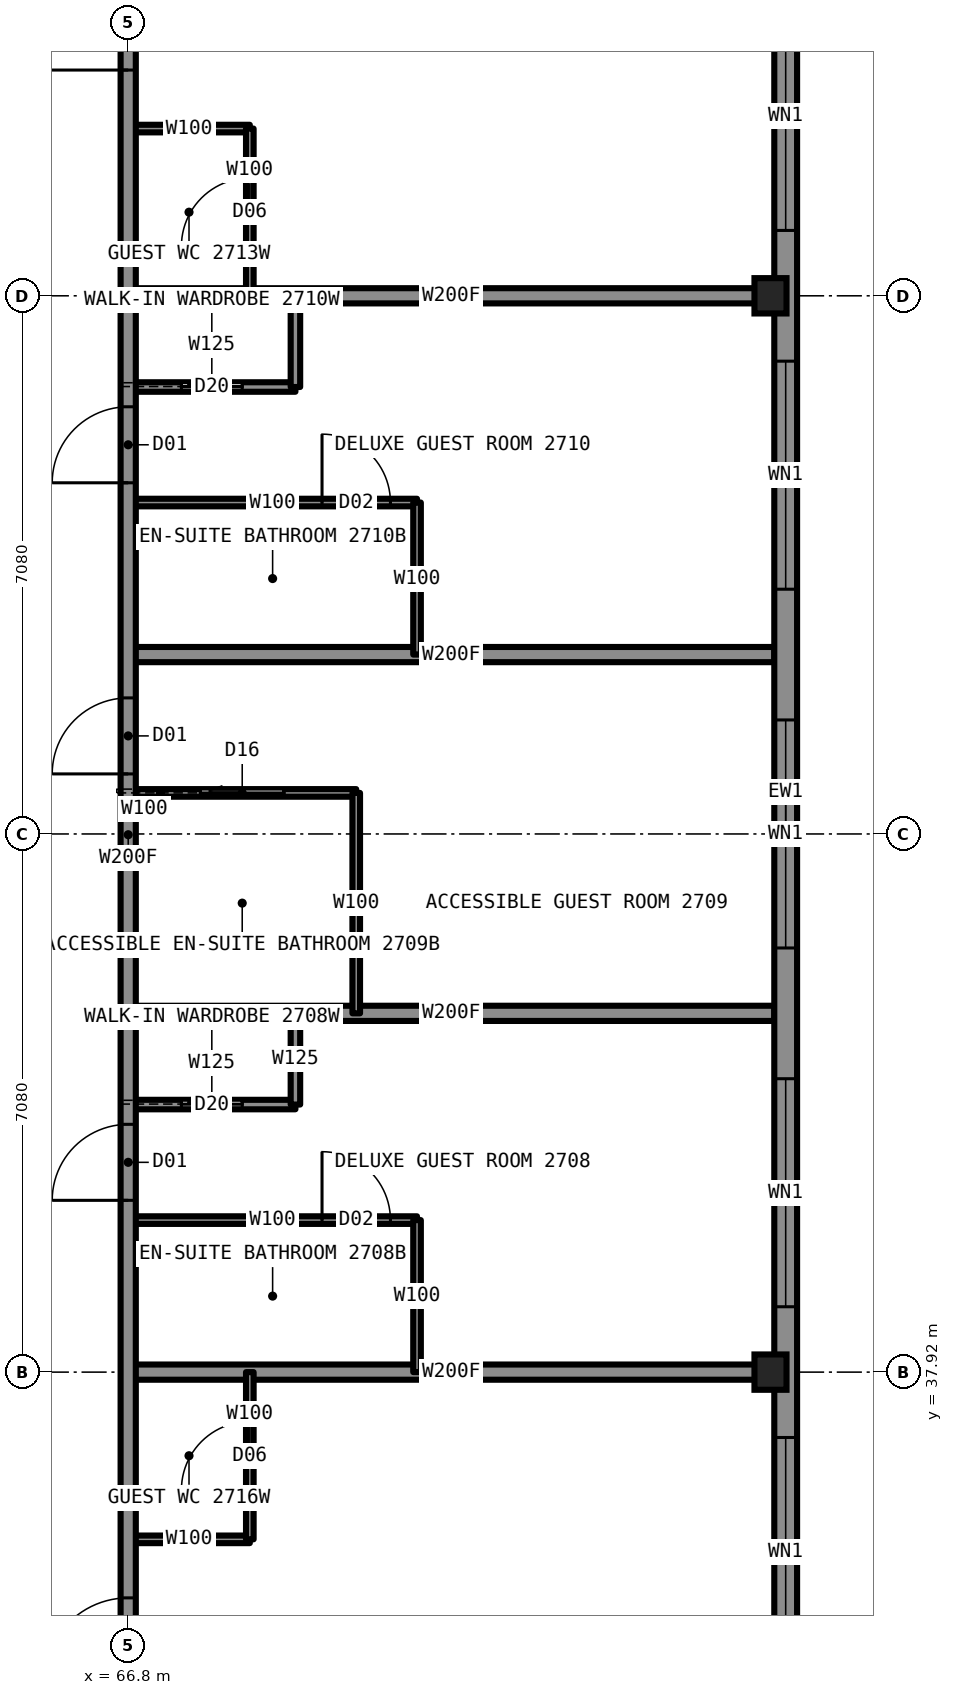
"""IFC4 building model, lengths in metres.
Left out: names, types, materials, properties, quantities, classifications, styles, units other than length and angle.
Written with IfcOpenShell. Run it as: python <this file> out.ifc"""

import sys

from ifc_helpers import new_model, si_unit, direction, frame, frame_2d, origin, origin_2d, place, context, subcontext, project, spatial, rectangle, i_section, extrude, element, fill, save


model = new_model("IFC4")
c1 = context("Model", 3, precision=1e-05, world=origin(), true_north=direction((0.0, 1.0)))
c2 = subcontext(c1, "Body", "Model", "MODEL_VIEW")
j1 = project(units=[si_unit("LENGTHUNIT", "METRE"), si_unit("PLANEANGLEUNIT", "RADIAN")], contexts=[c1])
p1 = place(None, origin())
s1 = spatial("IfcSite", under=j1, at=p1, CompositionType="ELEMENT")
p2 = place(p1, origin())
s2 = spatial("IfcBuilding", under=s1, at=p2, CompositionType="ELEMENT")
p3 = place(p2, frame((0.0, 0.0, 103.9)))
s3 = spatial("IfcBuildingStorey", under=s2, at=p3, CompositionType="ELEMENT", Elevation=103.9)
for number, where, z_axis, x_axis in (
    (1, (75.25, 37.92, 0.0), (0.0, 0.0, 1.0), (1.0, 0.0, 0.0)),
    (2, (75.25, 52.08, 0.0), (0.0, 0.0, 1.0), (1.0, 0.0, 0.0)),
):
    element("IfcColumn", number, at=place(p3, frame(where, z_axis=z_axis, x_axis=x_axis)), inside=s3, PredefinedType="COLUMN", context=c2, shape_type="SweptSolid", body=[
        extrude(i_section(OverallWidth=0.422, OverallDepth=0.465, WebThickness=0.045, FlangeThickness=0.073, at=origin_2d()), origin(), (0.0, 0.0, 1.0), 3.5),
    ])
p4 = place(p3, frame((66.8, 42.64, 0.0), z_axis=(0.0, 0.0, 1.0), x_axis=(1.0, 0.0, 0.0)))
e3 = element("IfcWall", 3, at=p4, inside=s3, PredefinedType="PARTITIONING", context=c2, shape_type="SweptSolid", body=[
    extrude(rectangle(XDim=8.5, YDim=0.2, at=frame_2d((4.25, 0.0))), origin(), (0.0, 0.0, 1.0), 2.731),
])
p5 = place(p3, frame((66.8, 41.44, 0.0), z_axis=(0.0, 0.0, 1.0), x_axis=(1.0, 0.0, 0.0)))
e4 = element("IfcWall", 4, at=p5, inside=s3, PredefinedType="PARTITIONING", context=c2, shape_type="SweptSolid", body=[
    extrude(rectangle(XDim=2.2, YDim=0.125, at=frame_2d((1.1, 0.0))), origin(), (0.0, 0.0, 1.0), 3.33),
])
p6 = place(p5, frame((0.7, 0.0, 0.0)))
e5 = element("IfcOpeningElement", 5, at=p6, cuts=e4, PredefinedType="OPENING", context=c2, shape_type="SweptSolid", body=[
    extrude(rectangle(XDim=0.8, YDim=2.1, at=frame_2d((0.4, 1.05))), frame((0.0, 0.073, 0.0), z_axis=(0.0, -1.0, 0.0), x_axis=(1.0, 0.0, 0.0)), (0.0, 0.0, 1.0), 0.145),
])
p7 = place(p3, frame((66.8, 39.92, 0.0), z_axis=(0.0, 0.0, 1.0), x_axis=(1.0, 0.0, 0.0)))
e6 = element("IfcWall", 6, at=p7, inside=s3, PredefinedType="PARTITIONING", context=c2, shape_type="SweptSolid", body=[
    extrude(rectangle(XDim=3.8, YDim=0.1, at=frame_2d((1.9, 0.0))), origin(), (0.0, 0.0, 1.0), 3.33),
])
p8 = place(p7, frame((2.55, 0.0, 0.0)))
e7 = element("IfcOpeningElement", 7, at=p8, cuts=e6, PredefinedType="OPENING", context=c2, shape_type="SweptSolid", body=[
    extrude(rectangle(XDim=0.9, YDim=2.1, at=frame_2d((0.45, 1.05))), frame((0.0, 0.06, 0.0), z_axis=(0.0, -1.0, 0.0), x_axis=(1.0, 0.0, 0.0)), (0.0, 0.0, 1.0), 0.12),
])
p9 = place(p3, frame((66.8, 37.92, 0.0), z_axis=(0.0, 0.0, 1.0), x_axis=(1.0, 0.0, 0.0)))
e8 = element("IfcWall", 8, at=p9, inside=s3, PredefinedType="PARTITIONING", context=c2, shape_type="SweptSolid", body=[
    extrude(rectangle(XDim=8.5, YDim=0.2, at=frame_2d((4.25, 0.0))), origin(), (0.0, 0.0, 1.0), 2.573),
])
p10 = place(p3, frame((66.8, 35.72, 0.0), z_axis=(0.0, 0.0, 1.0), x_axis=(1.0, 0.0, 0.0)))
e9 = element("IfcWall", 9, at=p10, inside=s3, PredefinedType="PARTITIONING", context=c2, shape_type="SweptSolid", body=[
    extrude(rectangle(XDim=1.6, YDim=0.1, at=frame_2d((0.8, 0.0))), origin(), (0.0, 0.0, 1.0), 3.33),
])
p11 = place(p3, frame((66.8, 45.54, 0.0), z_axis=(0.0, 0.0, 1.0), x_axis=(1.0, 0.0, 0.0)))
e10 = element("IfcWall", 10, at=p11, inside=s3, PredefinedType="PARTITIONING", context=c2, shape_type="SweptSolid", body=[
    extrude(rectangle(XDim=3.0, YDim=0.1, at=frame_2d((1.5, 0.0))), origin(), (0.0, 0.0, 1.0), 3.33),
])
p12 = place(p11, frame((0.95, 0.0, 0.0)))
e11 = element("IfcOpeningElement", 11, at=p12, cuts=e10, PredefinedType="OPENING", context=c2, shape_type="SweptSolid", body=[
    extrude(rectangle(XDim=1.1, YDim=2.1, at=frame_2d((0.55, 1.05))), frame((0.0, 0.06, 0.0), z_axis=(0.0, -1.0, 0.0), x_axis=(1.0, 0.0, 0.0)), (0.0, 0.0, 1.0), 0.12),
])
p13 = place(p3, frame((66.8, 47.36, 0.0), z_axis=(0.0, 0.0, 1.0), x_axis=(1.0, 0.0, 0.0)))
e12 = element("IfcWall", 12, at=p13, inside=s3, PredefinedType="PARTITIONING", context=c2, shape_type="SweptSolid", body=[
    extrude(rectangle(XDim=8.5, YDim=0.2, at=frame_2d((4.25, 0.0))), origin(), (0.0, 0.0, 1.0), 2.731),
])
p14 = place(p3, frame((66.8, 49.36, 0.0), z_axis=(0.0, 0.0, 1.0), x_axis=(1.0, 0.0, 0.0)))
e13 = element("IfcWall", 13, at=p14, inside=s3, PredefinedType="PARTITIONING", context=c2, shape_type="SweptSolid", body=[
    extrude(rectangle(XDim=3.8, YDim=0.1, at=frame_2d((1.9, 0.0))), origin(), (0.0, 0.0, 1.0), 3.33),
])
p15 = place(p14, frame((2.55, 0.0, 0.0)))
e14 = element("IfcOpeningElement", 14, at=p15, cuts=e13, PredefinedType="OPENING", context=c2, shape_type="SweptSolid", body=[
    extrude(rectangle(XDim=0.9, YDim=2.1, at=frame_2d((0.45, 1.05))), frame((0.0, 0.06, 0.0), z_axis=(0.0, -1.0, 0.0), x_axis=(1.0, 0.0, 0.0)), (0.0, 0.0, 1.0), 0.12),
])
p16 = place(p3, frame((66.8, 50.88, 0.0), z_axis=(0.0, 0.0, 1.0), x_axis=(1.0, 0.0, 0.0)))
e15 = element("IfcWall", 15, at=p16, inside=s3, PredefinedType="PARTITIONING", context=c2, shape_type="SweptSolid", body=[
    extrude(rectangle(XDim=2.2, YDim=0.125, at=frame_2d((1.1, 0.0))), origin(), (0.0, 0.0, 1.0), 3.33),
])
p17 = place(p16, frame((0.7, 0.0, 0.0)))
e16 = element("IfcOpeningElement", 16, at=p17, cuts=e15, PredefinedType="OPENING", context=c2, shape_type="SweptSolid", body=[
    extrude(rectangle(XDim=0.8, YDim=2.1, at=frame_2d((0.4, 1.05))), frame((0.0, 0.073, 0.0), z_axis=(0.0, -1.0, 0.0), x_axis=(1.0, 0.0, 0.0)), (0.0, 0.0, 1.0), 0.145),
])
p18 = place(p3, frame((66.8, 52.08, 0.0), z_axis=(0.0, 0.0, 1.0), x_axis=(1.0, 0.0, 0.0)))
e17 = element("IfcWall", 17, at=p18, inside=s3, PredefinedType="PARTITIONING", context=c2, shape_type="SweptSolid", body=[
    extrude(rectangle(XDim=8.5, YDim=0.2, at=frame_2d((4.25, 0.0))), origin(), (0.0, 0.0, 1.0), 2.573),
])
p19 = place(p3, frame((66.8, 54.28, 0.0), z_axis=(0.0, 0.0, 1.0), x_axis=(1.0, 0.0, 0.0)))
e18 = element("IfcWall", 18, at=p19, inside=s3, PredefinedType="PARTITIONING", context=c2, shape_type="SweptSolid", body=[
    extrude(rectangle(XDim=1.6, YDim=0.1, at=frame_2d((0.8, 0.0))), origin(), (0.0, 0.0, 1.0), 3.33),
])
p20 = place(p3, frame((66.8, 33.2, 0.0), z_axis=(0.0, 0.0, 1.0), x_axis=(0.0, 1.0, 0.0)))
e19 = element("IfcWall", 19, at=p20, inside=s3, PredefinedType="PARTITIONING", context=c2, shape_type="SweptSolid", body=[
    extrude(rectangle(XDim=23.58, YDim=0.2, at=frame_2d((11.79, 0.0))), origin(), (0.0, 0.0, 1.0), 3.33),
])
p21 = place(p20, frame((6.98, 0.0, 0.0)))
e20 = element("IfcOpeningElement", 20, at=p21, cuts=e19, PredefinedType="OPENING", context=c2, shape_type="SweptSolid", body=[
    extrude(rectangle(XDim=1.0, YDim=2.2, at=frame_2d((0.5, 1.1))), frame((0.0, 0.11, 0.0), z_axis=(0.0, -1.0, 0.0), x_axis=(1.0, 0.0, 0.0)), (0.0, 0.0, 1.0), 0.22),
])
p22 = place(p20, frame((12.59, 0.0, 0.0)))
e21 = element("IfcOpeningElement", 21, at=p22, cuts=e19, PredefinedType="OPENING", context=c2, shape_type="SweptSolid", body=[
    extrude(rectangle(XDim=1.0, YDim=2.2, at=frame_2d((0.5, 1.1))), frame((0.0, 0.11, 0.0), z_axis=(0.0, -1.0, 0.0), x_axis=(1.0, 0.0, 0.0)), (0.0, 0.0, 1.0), 0.22),
])
p23 = place(p20, frame((16.42, 0.0, 0.0)))
e22 = element("IfcOpeningElement", 22, at=p23, cuts=e19, PredefinedType="OPENING", context=c2, shape_type="SweptSolid", body=[
    extrude(rectangle(XDim=1.0, YDim=2.2, at=frame_2d((0.5, 1.1))), frame((0.0, 0.11, 0.0), z_axis=(0.0, -1.0, 0.0), x_axis=(1.0, 0.0, 0.0)), (0.0, 0.0, 1.0), 0.22),
])
p24 = place(p20, frame((21.85, 0.0, 0.0)))
e23 = element("IfcOpeningElement", 23, at=p24, cuts=e19, PredefinedType="OPENING", context=c2, shape_type="SweptSolid", body=[
    extrude(rectangle(XDim=1.1, YDim=2.2, at=frame_2d((0.55, 1.1))), frame((0.0, 0.11, 0.0), z_axis=(0.0, -1.0, 0.0), x_axis=(1.0, 0.0, 0.0)), (0.0, 0.0, 1.0), 0.22),
])
p25 = place(p20, frame((0.65, 0.0, 0.0)))
e24 = element("IfcOpeningElement", 24, at=p25, cuts=e19, PredefinedType="OPENING", context=c2, shape_type="SweptSolid", body=[
    extrude(rectangle(XDim=1.1, YDim=2.2, at=frame_2d((0.55, 1.1))), frame((0.0, 0.11, 0.0), z_axis=(0.0, -1.0, 0.0), x_axis=(1.0, 0.0, 0.0)), (0.0, 0.0, 1.0), 0.22),
])
p26 = place(p3, frame((68.4, 35.72, 0.0), z_axis=(0.0, 0.0, 1.0), x_axis=(0.0, 1.0, 0.0)))
e25 = element("IfcWall", 25, at=p26, inside=s3, PredefinedType="PARTITIONING", context=c2, shape_type="SweptSolid", body=[
    extrude(rectangle(XDim=2.2, YDim=0.1, at=frame_2d((1.1, 0.0))), origin(), (0.0, 0.0, 1.0), 3.33),
])
p27 = place(p26, frame((0.65, 0.0, 0.0)))
e26 = element("IfcOpeningElement", 26, at=p27, cuts=e25, PredefinedType="OPENING", context=c2, shape_type="SweptSolid", body=[
    extrude(rectangle(XDim=0.9, YDim=2.1, at=frame_2d((0.45, 1.05))), frame((0.0, 0.06, 0.0), z_axis=(0.0, -1.0, 0.0), x_axis=(1.0, 0.0, 0.0)), (0.0, 0.0, 1.0), 0.12),
])
p28 = place(p3, frame((68.4, 52.08, 0.0), z_axis=(0.0, 0.0, 1.0), x_axis=(0.0, 1.0, 0.0)))
e27 = element("IfcWall", 27, at=p28, inside=s3, PredefinedType="PARTITIONING", context=c2, shape_type="SweptSolid", body=[
    extrude(rectangle(XDim=2.2, YDim=0.1, at=frame_2d((1.1, 0.0))), origin(), (0.0, 0.0, 1.0), 3.33),
])
p29 = place(p28, frame((0.65, 0.0, 0.0)))
e28 = element("IfcOpeningElement", 28, at=p29, cuts=e27, PredefinedType="OPENING", context=c2, shape_type="SweptSolid", body=[
    extrude(rectangle(XDim=0.9, YDim=2.1, at=frame_2d((0.45, 1.05))), frame((0.0, 0.06, 0.0), z_axis=(0.0, -1.0, 0.0), x_axis=(1.0, 0.0, 0.0)), (0.0, 0.0, 1.0), 0.12),
])
p30 = place(p3, frame((69.0, 41.44, 0.0), z_axis=(0.0, 0.0, 1.0), x_axis=(0.0, 1.0, 0.0)))
e29 = element("IfcWall", 29, at=p30, inside=s3, PredefinedType="PARTITIONING", context=c2, shape_type="SweptSolid", body=[
    extrude(rectangle(XDim=1.2, YDim=0.125, at=frame_2d((0.6, 0.0))), origin(), (0.0, 0.0, 1.0), 3.33),
])
p31 = place(p3, frame((69.0, 50.88, 0.0), z_axis=(0.0, 0.0, 1.0), x_axis=(0.0, 1.0, 0.0)))
e30 = element("IfcWall", 30, at=p31, inside=s3, PredefinedType="PARTITIONING", context=c2, shape_type="SweptSolid", body=[
    extrude(rectangle(XDim=1.2, YDim=0.125, at=frame_2d((0.6, 0.0))), origin(), (0.0, 0.0, 1.0), 3.33),
])
p32 = place(p3, frame((69.8, 42.64, 0.0), z_axis=(0.0, 0.0, 1.0), x_axis=(0.0, 1.0, 0.0)))
e31 = element("IfcWall", 31, at=p32, inside=s3, PredefinedType="PARTITIONING", context=c2, shape_type="SweptSolid", body=[
    extrude(rectangle(XDim=2.9, YDim=0.1, at=frame_2d((1.45, 0.0))), origin(), (0.0, 0.0, 1.0), 3.33),
])
for number, where, z_axis, x_axis in (
    (32, (70.6, 37.92, 0.0), (0.0, 0.0, 1.0), (0.0, 1.0, 0.0)),
    (33, (70.6, 47.36, 0.0), (0.0, 0.0, 1.0), (0.0, 1.0, 0.0)),
):
    element("IfcWall", number, at=place(p3, frame(where, z_axis=z_axis, x_axis=x_axis)), inside=s3, PredefinedType="PARTITIONING", context=c2, shape_type="SweptSolid", body=[
        extrude(rectangle(XDim=2.0, YDim=0.1, at=frame_2d((1.0, 0.0))), origin(), (0.0, 0.0, 1.0), 3.33),
    ])
p33 = place(p3, frame((75.45, 29.9, 0.0), z_axis=(0.0, 0.0, 1.0), x_axis=(0.0, 1.0, 0.0)))
e34 = element("IfcWall", 34, at=p33, inside=s3, PredefinedType="SOLIDWALL", context=c2, shape_type="SweptSolid", body=[
    extrude(rectangle(XDim=30.2, YDim=0.3, at=frame_2d((15.1, 0.0))), origin(), (0.0, 0.0, 1.0), 2.83),
])
p34 = place(p33, frame((4.16, 0.0, 0.5)))
e35 = element("IfcOpeningElement", 35, at=p34, cuts=e34, PredefinedType="OPENING", context=c2, shape_type="SweptSolid", body=[
    extrude(rectangle(XDim=3.0, YDim=2.0, at=frame_2d((1.5, 1.0))), frame((0.0, 0.16, 0.0), z_axis=(0.0, -1.0, 0.0), x_axis=(1.0, 0.0, 0.0)), (0.0, 0.0, 1.0), 0.32),
])
p35 = place(p33, frame((8.88, 0.0, 0.5)))
e36 = element("IfcOpeningElement", 36, at=p35, cuts=e34, PredefinedType="OPENING", context=c2, shape_type="SweptSolid", body=[
    extrude(rectangle(XDim=3.0, YDim=2.0, at=frame_2d((1.5, 1.0))), frame((0.0, 0.16, 0.0), z_axis=(0.0, -1.0, 0.0), x_axis=(1.0, 0.0, 0.0)), (0.0, 0.0, 1.0), 0.32),
])
p36 = place(p33, frame((13.6, 0.0, 0.5)))
e37 = element("IfcOpeningElement", 37, at=p36, cuts=e34, PredefinedType="OPENING", context=c2, shape_type="SweptSolid", body=[
    extrude(rectangle(XDim=3.0, YDim=2.0, at=frame_2d((1.5, 1.0))), frame((0.0, 0.16, 0.0), z_axis=(0.0, -1.0, 0.0), x_axis=(1.0, 0.0, 0.0)), (0.0, 0.0, 1.0), 0.32),
])
p37 = place(p33, frame((18.32, 0.0, 0.5)))
e38 = element("IfcOpeningElement", 38, at=p37, cuts=e34, PredefinedType="OPENING", context=c2, shape_type="SweptSolid", body=[
    extrude(rectangle(XDim=3.0, YDim=2.0, at=frame_2d((1.5, 1.0))), frame((0.0, 0.16, 0.0), z_axis=(0.0, -1.0, 0.0), x_axis=(1.0, 0.0, 0.0)), (0.0, 0.0, 1.0), 0.32),
])
p38 = place(p33, frame((23.04, 0.0, 0.5)))
e39 = element("IfcOpeningElement", 39, at=p38, cuts=e34, PredefinedType="OPENING", context=c2, shape_type="SweptSolid", body=[
    extrude(rectangle(XDim=3.0, YDim=2.0, at=frame_2d((1.5, 1.0))), frame((0.0, 0.16, 0.0), z_axis=(0.0, -1.0, 0.0), x_axis=(1.0, 0.0, 0.0)), (0.0, 0.0, 1.0), 0.32),
])
p39 = place(p21, origin())
e40 = element("IfcDoor", 40, at=p39, inside=s3, OperationType="SINGLE_SWING_LEFT", PredefinedType="DOOR", context=c2, shape_type="SweptSolid", body=[
    extrude(rectangle(XDim=1.0, YDim=2.2, at=frame_2d((0.5, 1.1))), frame((0.0, 0.025, 0.0), z_axis=(0.0, -1.0, 0.0), x_axis=(1.0, 0.0, 0.0)), (0.0, 0.0, 1.0), 0.05),
])
fill(e20, e40)
p40 = place(p8, origin())
e41 = element("IfcDoor", 41, at=p40, inside=s3, OperationType="SINGLE_SWING_RIGHT", PredefinedType="DOOR", context=c2, shape_type="SweptSolid", body=[
    extrude(rectangle(XDim=0.9, YDim=2.1, at=frame_2d((0.45, 1.05))), frame((0.0, 0.025, 0.0), z_axis=(0.0, -1.0, 0.0), x_axis=(1.0, 0.0, 0.0)), (0.0, 0.0, 1.0), 0.05),
])
fill(e7, e41)
p41 = place(p6, origin())
e42 = element("IfcDoor", 42, at=p41, inside=s3, OperationType="SLIDING_TO_LEFT", PredefinedType="DOOR", context=c2, shape_type="SweptSolid", body=[
    extrude(rectangle(XDim=0.8, YDim=2.1, at=frame_2d((0.4, 1.05))), frame((0.0, 0.025, 0.0), z_axis=(0.0, -1.0, 0.0), x_axis=(1.0, 0.0, 0.0)), (0.0, 0.0, 1.0), 0.05),
])
fill(e5, e42)
p42 = place(p22, origin())
e43 = element("IfcDoor", 43, at=p42, inside=s3, OperationType="SINGLE_SWING_LEFT", PredefinedType="DOOR", context=c2, shape_type="SweptSolid", body=[
    extrude(rectangle(XDim=1.0, YDim=2.2, at=frame_2d((0.5, 1.1))), frame((0.0, 0.025, 0.0), z_axis=(0.0, -1.0, 0.0), x_axis=(1.0, 0.0, 0.0)), (0.0, 0.0, 1.0), 0.05),
])
fill(e21, e43)
p43 = place(p12, origin())
e44 = element("IfcDoor", 44, at=p43, inside=s3, OperationType="SLIDING_TO_LEFT", PredefinedType="DOOR", context=c2, shape_type="SweptSolid", body=[
    extrude(rectangle(XDim=1.1, YDim=2.1, at=frame_2d((0.55, 1.05))), frame((0.0, 0.025, 0.0), z_axis=(0.0, -1.0, 0.0), x_axis=(1.0, 0.0, 0.0)), (0.0, 0.0, 1.0), 0.05),
])
fill(e11, e44)
p44 = place(p23, origin())
e45 = element("IfcDoor", 45, at=p44, inside=s3, OperationType="SINGLE_SWING_LEFT", PredefinedType="DOOR", context=c2, shape_type="SweptSolid", body=[
    extrude(rectangle(XDim=1.0, YDim=2.2, at=frame_2d((0.5, 1.1))), frame((0.0, 0.025, 0.0), z_axis=(0.0, -1.0, 0.0), x_axis=(1.0, 0.0, 0.0)), (0.0, 0.0, 1.0), 0.05),
])
fill(e22, e45)
p45 = place(p15, origin())
e46 = element("IfcDoor", 46, at=p45, inside=s3, OperationType="SINGLE_SWING_RIGHT", PredefinedType="DOOR", context=c2, shape_type="SweptSolid", body=[
    extrude(rectangle(XDim=0.9, YDim=2.1, at=frame_2d((0.45, 1.05))), frame((0.0, 0.025, 0.0), z_axis=(0.0, -1.0, 0.0), x_axis=(1.0, 0.0, 0.0)), (0.0, 0.0, 1.0), 0.05),
])
fill(e14, e46)
p46 = place(p17, origin())
e47 = element("IfcDoor", 47, at=p46, inside=s3, OperationType="SLIDING_TO_LEFT", PredefinedType="DOOR", context=c2, shape_type="SweptSolid", body=[
    extrude(rectangle(XDim=0.8, YDim=2.1, at=frame_2d((0.4, 1.05))), frame((0.0, 0.025, 0.0), z_axis=(0.0, -1.0, 0.0), x_axis=(1.0, 0.0, 0.0)), (0.0, 0.0, 1.0), 0.05),
])
fill(e16, e47)
p47 = place(p24, origin())
e48 = element("IfcDoor", 48, at=p47, inside=s3, OperationType="SINGLE_SWING_LEFT", PredefinedType="DOOR", context=c2, shape_type="SweptSolid", body=[
    extrude(rectangle(XDim=1.1, YDim=2.2, at=frame_2d((0.55, 1.1))), frame((0.0, 0.025, 0.0), z_axis=(0.0, -1.0, 0.0), x_axis=(1.0, 0.0, 0.0)), (0.0, 0.0, 1.0), 0.05),
])
fill(e23, e48)
p48 = place(p29, origin())
e49 = element("IfcDoor", 49, at=p48, inside=s3, OperationType="SINGLE_SWING_LEFT", PredefinedType="DOOR", context=c2, shape_type="SweptSolid", body=[
    extrude(rectangle(XDim=0.9, YDim=2.1, at=frame_2d((0.45, 1.05))), frame((0.0, 0.025, 0.0), z_axis=(0.0, -1.0, 0.0), x_axis=(1.0, 0.0, 0.0)), (0.0, 0.0, 1.0), 0.05),
])
fill(e28, e49)
p49 = place(p25, origin())
e50 = element("IfcDoor", 50, at=p49, inside=s3, OperationType="SINGLE_SWING_LEFT", PredefinedType="DOOR", context=c2, shape_type="SweptSolid", body=[
    extrude(rectangle(XDim=1.1, YDim=2.2, at=frame_2d((0.55, 1.1))), frame((0.0, 0.025, 0.0), z_axis=(0.0, -1.0, 0.0), x_axis=(1.0, 0.0, 0.0)), (0.0, 0.0, 1.0), 0.05),
])
fill(e24, e50)
p50 = place(p27, origin())
e51 = element("IfcDoor", 51, at=p50, inside=s3, OperationType="SINGLE_SWING_LEFT", PredefinedType="DOOR", context=c2, shape_type="SweptSolid", body=[
    extrude(rectangle(XDim=0.9, YDim=2.1, at=frame_2d((0.45, 1.05))), frame((0.0, 0.025, 0.0), z_axis=(0.0, -1.0, 0.0), x_axis=(1.0, 0.0, 0.0)), (0.0, 0.0, 1.0), 0.05),
])
fill(e26, e51)
p51 = place(p34, origin())
e52 = element("IfcWindow", 52, at=p51, inside=s3, PartitioningType="SINGLE_PANEL", PredefinedType="WINDOW", context=c2, shape_type="SweptSolid", body=[
    extrude(rectangle(XDim=3.0, YDim=2.0, at=frame_2d((1.5, 1.0))), frame((0.0, 0.03, 0.0), z_axis=(0.0, -1.0, 0.0), x_axis=(1.0, 0.0, 0.0)), (0.0, 0.0, 1.0), 0.06),
])
fill(e35, e52)
p52 = place(p35, origin())
e53 = element("IfcWindow", 53, at=p52, inside=s3, PartitioningType="SINGLE_PANEL", PredefinedType="WINDOW", context=c2, shape_type="SweptSolid", body=[
    extrude(rectangle(XDim=3.0, YDim=2.0, at=frame_2d((1.5, 1.0))), frame((0.0, 0.03, 0.0), z_axis=(0.0, -1.0, 0.0), x_axis=(1.0, 0.0, 0.0)), (0.0, 0.0, 1.0), 0.06),
])
fill(e36, e53)
p53 = place(p36, origin())
e54 = element("IfcWindow", 54, at=p53, inside=s3, PartitioningType="SINGLE_PANEL", PredefinedType="WINDOW", context=c2, shape_type="SweptSolid", body=[
    extrude(rectangle(XDim=3.0, YDim=2.0, at=frame_2d((1.5, 1.0))), frame((0.0, 0.03, 0.0), z_axis=(0.0, -1.0, 0.0), x_axis=(1.0, 0.0, 0.0)), (0.0, 0.0, 1.0), 0.06),
])
fill(e37, e54)
p54 = place(p37, origin())
e55 = element("IfcWindow", 55, at=p54, inside=s3, PartitioningType="SINGLE_PANEL", PredefinedType="WINDOW", context=c2, shape_type="SweptSolid", body=[
    extrude(rectangle(XDim=3.0, YDim=2.0, at=frame_2d((1.5, 1.0))), frame((0.0, 0.03, 0.0), z_axis=(0.0, -1.0, 0.0), x_axis=(1.0, 0.0, 0.0)), (0.0, 0.0, 1.0), 0.06),
])
fill(e38, e55)
p55 = place(p38, origin())
e56 = element("IfcWindow", 56, at=p55, inside=s3, PartitioningType="SINGLE_PANEL", PredefinedType="WINDOW", context=c2, shape_type="SweptSolid", body=[
    extrude(rectangle(XDim=3.0, YDim=2.0, at=frame_2d((1.5, 1.0))), frame((0.0, 0.03, 0.0), z_axis=(0.0, -1.0, 0.0), x_axis=(1.0, 0.0, 0.0)), (0.0, 0.0, 1.0), 0.06),
])
fill(e39, e56)
save(model, sys.argv[1])
